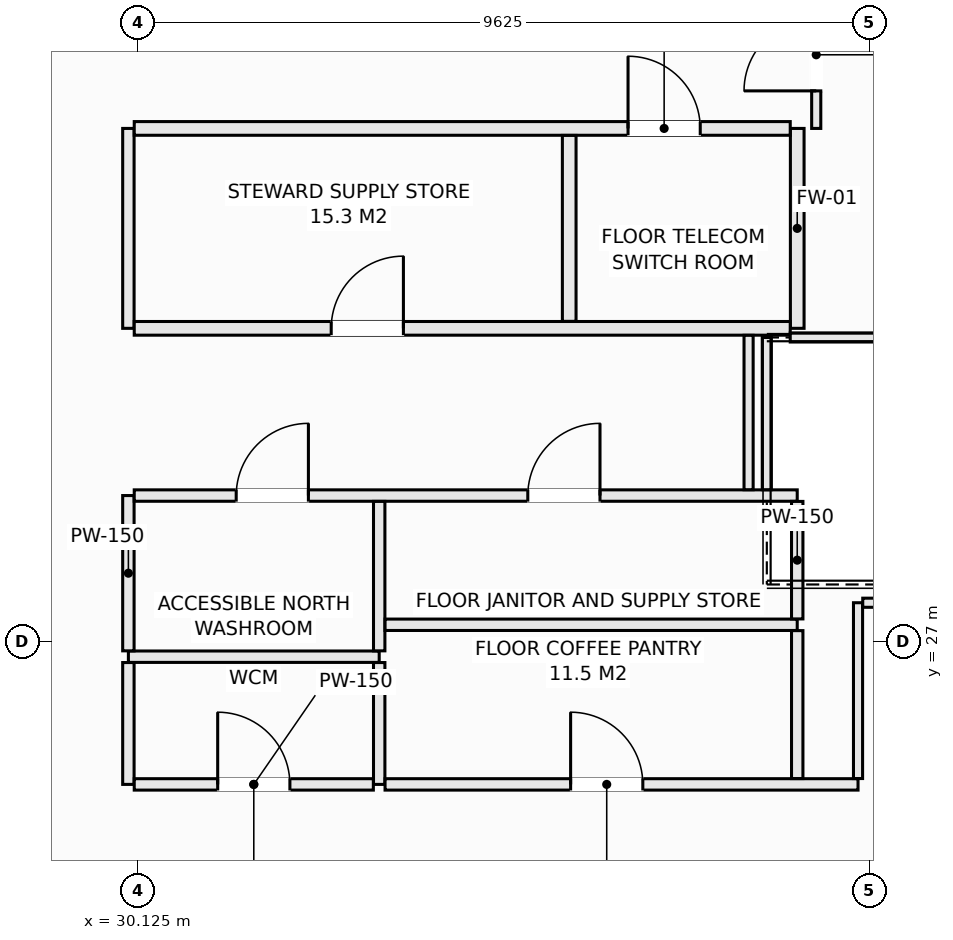
"""IFC4 building model, lengths in metres.
Left out: names, types, materials, properties, quantities, classifications, styles, units other than length and angle.
Written with IfcOpenShell. Run it as: python <this file> out.ifc"""

import sys

from ifc_helpers import new_model, si_unit, direction, frame, frame_2d, origin, place, context, subcontext, project, spatial, rectangle, extrude, element, fill, save


model = new_model("IFC4")
c1 = context("Model", 3, precision=1e-05, world=origin(), true_north=direction((0.0, 1.0)))
c2 = subcontext(c1, "Body", "Model", "MODEL_VIEW")
j1 = project(units=[si_unit("LENGTHUNIT", "METRE"), si_unit("PLANEANGLEUNIT", "RADIAN")], contexts=[c1])
p1 = place(None, origin())
s1 = spatial("IfcSite", under=j1, at=p1, CompositionType="ELEMENT")
p2 = place(p1, origin())
s2 = spatial("IfcBuilding", under=s1, at=p2, CompositionType="ELEMENT")
p3 = place(p2, frame((0.0, 0.0, 203.0)))
s3 = spatial("IfcBuildingStorey", under=s2, at=p3, CompositionType="ELEMENT", Elevation=203.0)
p4 = place(p3, frame((30.0, 26.8, 0.0), z_axis=(0.0, 0.0, 1.0), x_axis=(1.0, 0.0, 0.0)))
e1 = element("IfcWall", 1, at=p4, inside=s3, PredefinedType="PARTITIONING", context=c2, shape_type="SweptSolid", body=[
    extrude(rectangle(XDim=3.3, YDim=0.15, at=frame_2d((1.65, 0.0))), origin(), (0.0, 0.0, 1.0), 3.03),
])
p5 = place(p3, frame((30.0, 25.12, 0.0), z_axis=(0.0, 0.0, 1.0), x_axis=(0.0, 1.0, 0.0)))
e2 = element("IfcWall", 2, at=p5, inside=s3, PredefinedType="PARTITIONING", context=c2, shape_type="SweptSolid", body=[
    extrude(rectangle(XDim=1.603, YDim=0.15, at=frame_2d((0.801, 0.0))), origin(), (0.0, 0.0, 1.0), 3.03),
])
p6 = place(p3, frame((30.0, 26.877, 0.0), z_axis=(0.0, 0.0, 1.0), x_axis=(0.0, 1.0, 0.0)))
e3 = element("IfcWall", 3, at=p6, inside=s3, PredefinedType="PARTITIONING", context=c2, shape_type="SweptSolid", body=[
    extrude(rectangle(XDim=2.043, YDim=0.15, at=frame_2d((1.021, 0.0))), origin(), (0.0, 0.0, 1.0), 3.03),
])
p7 = place(p3, frame((30.0, 31.12, 0.0), z_axis=(0.0, 0.0, 1.0), x_axis=(0.0, 1.0, 0.0)))
e4 = element("IfcWall", 4, at=p7, inside=s3, PredefinedType="PARTITIONING", context=c2, shape_type="SweptSolid", body=[
    extrude(rectangle(XDim=2.63, YDim=0.15, at=frame_2d((1.315, 0.0))), origin(), (0.0, 0.0, 1.0), 3.03),
])
p8 = place(p3, frame((30.077, 28.92, 0.0), z_axis=(0.0, 0.0, 1.0), x_axis=(1.0, 0.0, 0.0)))
e5 = element("IfcWall", 5, at=p8, inside=s3, PredefinedType="PARTITIONING", context=c2, shape_type="SweptSolid", body=[
    extrude(rectangle(XDim=8.723, YDim=0.15, at=frame_2d((4.362, 0.0))), origin(), (0.0, 0.0, 1.0), 3.03),
])
p9 = place(p8, frame((1.342, 0.0, 0.0)))
e6 = element("IfcOpeningElement", 6, at=p9, cuts=e5, PredefinedType="OPENING", context=c2, shape_type="SweptSolid", body=[
    extrude(rectangle(XDim=0.95, YDim=2.1, at=frame_2d((0.475, 1.05))), frame((0.0, 0.085, 0.0), z_axis=(0.0, -1.0, 0.0), x_axis=(1.0, 0.0, 0.0)), (0.0, 0.0, 1.0), 0.17),
])
p10 = place(p8, frame((5.178, 0.0, 0.0)))
e7 = element("IfcOpeningElement", 7, at=p10, cuts=e5, PredefinedType="OPENING", context=c2, shape_type="SweptSolid", body=[
    extrude(rectangle(XDim=0.95, YDim=2.1, at=frame_2d((0.475, 1.05))), frame((0.0, 0.085, 0.0), z_axis=(0.0, -1.0, 0.0), x_axis=(1.0, 0.0, 0.0)), (0.0, 0.0, 1.0), 0.17),
])
p11 = place(p3, frame((33.3, 25.12, 0.0), z_axis=(0.0, 0.0, 1.0), x_axis=(0.0, 1.0, 0.0)))
e8 = element("IfcWall", 8, at=p11, inside=s3, PredefinedType="PARTITIONING", context=c2, shape_type="SweptSolid", body=[
    extrude(rectangle(XDim=1.603, YDim=0.15, at=frame_2d((0.801, 0.0))), origin(), (0.0, 0.0, 1.0), 3.03),
])
p12 = place(p3, frame((33.3, 26.877, 0.0), z_axis=(0.0, 0.0, 1.0), x_axis=(0.0, 1.0, 0.0)))
e9 = element("IfcWall", 9, at=p12, inside=s3, PredefinedType="PARTITIONING", context=c2, shape_type="SweptSolid", body=[
    extrude(rectangle(XDim=1.966, YDim=0.15, at=frame_2d((0.983, 0.0))), origin(), (0.0, 0.0, 1.0), 3.03),
])
p13 = place(p3, frame((30.077, 25.12, 0.0), z_axis=(0.0, 0.0, 1.0), x_axis=(1.0, 0.0, 0.0)))
e10 = element("IfcWall", 10, at=p13, inside=s3, PredefinedType="PARTITIONING", context=c2, shape_type="SweptSolid", body=[
    extrude(rectangle(XDim=3.146, YDim=0.15, at=frame_2d((1.573, 0.0))), origin(), (0.0, 0.0, 1.0), 3.03),
])
p14 = place(p13, frame((1.098, 0.0, 0.0)))
e11 = element("IfcOpeningElement", 11, at=p14, cuts=e10, PredefinedType="OPENING", context=c2, shape_type="SweptSolid", body=[
    extrude(rectangle(XDim=0.95, YDim=2.1, at=frame_2d((0.475, 1.05))), frame((0.0, 0.085, 0.0), z_axis=(0.0, -1.0, 0.0), x_axis=(1.0, 0.0, 0.0)), (0.0, 0.0, 1.0), 0.17),
])
p15 = place(p3, frame((33.377, 25.12, 0.0), z_axis=(0.0, 0.0, 1.0), x_axis=(1.0, 0.0, 0.0)))
e12 = element("IfcWall", 12, at=p15, inside=s3, PredefinedType="PARTITIONING", context=c2, shape_type="SweptSolid", body=[
    extrude(rectangle(XDim=6.223, YDim=0.15, at=frame_2d((3.112, 0.0))), origin(), (0.0, 0.0, 1.0), 3.03),
])
p16 = place(p15, frame((2.441, 0.0, 0.0)))
e13 = element("IfcOpeningElement", 13, at=p16, cuts=e12, PredefinedType="OPENING", context=c2, shape_type="SweptSolid", body=[
    extrude(rectangle(XDim=0.95, YDim=2.1, at=frame_2d((0.475, 1.05))), frame((0.0, 0.085, 0.0), z_axis=(0.0, -1.0, 0.0), x_axis=(1.0, 0.0, 0.0)), (0.0, 0.0, 1.0), 0.17),
])
p17 = place(p3, frame((33.377, 27.22, 0.0), z_axis=(0.0, 0.0, 1.0), x_axis=(1.0, 0.0, 0.0)))
e14 = element("IfcWall", 14, at=p17, inside=s3, PredefinedType="PARTITIONING", context=c2, shape_type="SweptSolid", body=[
    extrude(rectangle(XDim=5.423, YDim=0.15, at=frame_2d((2.711, 0.0))), origin(), (0.0, 0.0, 1.0), 3.03),
])
p18 = place(p3, frame((38.8, 25.197, 0.0), z_axis=(0.0, 0.0, 1.0), x_axis=(0.0, 1.0, 0.0)))
e15 = element("IfcWall", 15, at=p18, inside=s3, PredefinedType="PARTITIONING", context=c2, shape_type="SweptSolid", body=[
    extrude(rectangle(XDim=1.946, YDim=0.15, at=frame_2d((0.973, 0.0))), origin(), (0.0, 0.0, 1.0), 3.03),
])
p19 = place(p3, frame((38.8, 27.297, 0.0), z_axis=(0.0, 0.0, 1.0), x_axis=(0.0, 1.0, 0.0)))
e16 = element("IfcWall", 16, at=p19, inside=s3, PredefinedType="PARTITIONING", context=c2, shape_type="SweptSolid", body=[
    extrude(rectangle(XDim=1.546, YDim=0.15, at=frame_2d((0.773, 0.0))), origin(), (0.0, 0.0, 1.0), 3.03),
])
p20 = place(p3, frame((38.8, 31.12, 0.0), z_axis=(0.0, 0.0, 1.0), x_axis=(0.0, 1.0, 0.0)))
e17 = element("IfcWall", 17, at=p20, inside=s3, PredefinedType="SOLIDWALL", context=c2, shape_type="SweptSolid", body=[
    extrude(rectangle(XDim=2.63, YDim=0.18, at=frame_2d((1.315, 0.0))), origin(), (0.0, 0.0, 1.0), 3.03),
])
p21 = place(p3, frame((30.077, 31.12, 0.0), z_axis=(0.0, 0.0, 1.0), x_axis=(1.0, 0.0, 0.0)))
e18 = element("IfcWall", 18, at=p21, inside=s3, PredefinedType="SOLIDWALL", context=c2, shape_type="SweptSolid", body=[
    extrude(rectangle(XDim=8.631, YDim=0.18, at=frame_2d((4.315, 0.0))), origin(), (0.0, 0.0, 1.0), 3.03),
])
p22 = place(p21, frame((2.592, 0.0, 0.0)))
e19 = element("IfcOpeningElement", 19, at=p22, cuts=e18, PredefinedType="OPENING", context=c2, shape_type="SweptSolid", body=[
    extrude(rectangle(XDim=0.95, YDim=2.1, at=frame_2d((0.475, 1.05))), frame((0.0, 0.1, 0.0), z_axis=(0.0, -1.0, 0.0), x_axis=(1.0, 0.0, 0.0)), (0.0, 0.0, 1.0), 0.2),
])
p23 = place(p3, frame((30.077, 33.75, 0.0), z_axis=(0.0, 0.0, 1.0), x_axis=(1.0, 0.0, 0.0)))
e20 = element("IfcWall", 20, at=p23, inside=s3, PredefinedType="SOLIDWALL", context=c2, shape_type="SweptSolid", body=[
    extrude(rectangle(XDim=8.631, YDim=0.18, at=frame_2d((4.315, 0.0))), origin(), (0.0, 0.0, 1.0), 3.03),
])
p24 = place(p23, frame((6.497, 0.0, 0.0)))
e21 = element("IfcOpeningElement", 21, at=p24, cuts=e20, PredefinedType="OPENING", context=c2, shape_type="SweptSolid", body=[
    extrude(rectangle(XDim=0.95, YDim=2.1, at=frame_2d((0.475, 1.05))), frame((0.0, 0.1, 0.0), z_axis=(0.0, -1.0, 0.0), x_axis=(1.0, 0.0, 0.0)), (0.0, 0.0, 1.0), 0.2),
])
p25 = place(p3, frame((35.8, 31.212, 0.0), z_axis=(0.0, 0.0, 1.0), x_axis=(0.0, 1.0, 0.0)))
e22 = element("IfcWall", 22, at=p25, inside=s3, PredefinedType="SOLIDWALL", context=c2, shape_type="SweptSolid", body=[
    extrude(rectangle(XDim=2.446, YDim=0.18, at=frame_2d((1.223, 0.0))), origin(), (0.0, 0.0, 1.0), 3.03),
])
p26 = place(p3, frame((39.05, 33.75, 0.0), z_axis=(0.0, 0.0, 1.0), x_axis=(0.0, 1.0, 0.0)))
e23 = element("IfcWall", 23, at=p26, inside=s3, PredefinedType="PARTITIONING", context=c2, shape_type="SweptSolid", body=[
    extrude(rectangle(XDim=1.938, YDim=0.12, at=frame_2d((0.969, 0.0))), origin(), (0.0, 0.0, 1.0), 3.03),
])
p27 = place(p26, frame((0.494, 0.0, 0.0)))
e24 = element("IfcOpeningElement", 24, at=p27, cuts=e23, PredefinedType="OPENING", context=c2, shape_type="SweptSolid", body=[
    extrude(rectangle(XDim=0.95, YDim=2.1, at=frame_2d((0.475, 1.05))), frame((0.0, 0.07, 0.0), z_axis=(0.0, -1.0, 0.0), x_axis=(1.0, 0.0, 0.0)), (0.0, 0.0, 1.0), 0.14),
])
p28 = place(p3, frame((38.16, 28.997, 0.0), z_axis=(0.0, 0.0, 1.0), x_axis=(0.0, 1.0, 0.0)))
e25 = element("IfcWall", 25, at=p28, inside=s3, PredefinedType="PARTITIONING", context=c2, shape_type="SweptSolid", body=[
    extrude(rectangle(XDim=2.031, YDim=0.12, at=frame_2d((1.016, 0.0))), origin(), (0.0, 0.0, 1.0), 3.03),
])
p29 = place(p3, frame((39.6, 25.197, 0.0), z_axis=(0.0, 0.0, 1.0), x_axis=(0.0, 1.0, 0.0)))
e26 = element("IfcWall", 26, at=p29, inside=s3, PredefinedType="PARTITIONING", context=c2, shape_type="SweptSolid", body=[
    extrude(rectangle(XDim=2.313, YDim=0.12, at=frame_2d((1.156, 0.0))), origin(), (0.0, 0.0, 1.0), 3.03),
])
p30 = place(p3, frame((39.662, 27.51, 0.0), z_axis=(0.0, 0.0, 1.0), x_axis=(1.0, 0.0, 0.0)))
e27 = element("IfcWall", 27, at=p30, inside=s3, PredefinedType="PARTITIONING", context=c2, shape_type="SweptSolid", body=[
    extrude(rectangle(XDim=1.858, YDim=0.12, at=frame_2d((0.929, 0.0))), origin(), (0.0, 0.0, 1.0), 3.03),
])
p31 = place(p3, frame((38.708, 31.0, 0.0), z_axis=(0.0, 0.0, 1.0), x_axis=(1.0, 0.0, 0.0)))
e28 = element("IfcWall", 28, at=p31, inside=s3, PredefinedType="PARTITIONING", context=c2, shape_type="SweptSolid", body=[
    extrude(rectangle(XDim=5.302, YDim=0.12, at=frame_2d((2.651, 0.0))), origin(), (0.0, 0.0, 1.0), 3.03),
])
p32 = place(p3, frame((38.4, 28.997, 0.0), z_axis=(0.0, 0.0, 1.0), x_axis=(0.0, 1.0, 0.0)))
e29 = element("IfcWall", 29, at=p32, inside=s3, PredefinedType="PARTITIONING", context=c2, shape_type="SweptSolid", body=[
    extrude(rectangle(XDim=2.003, YDim=0.12, at=frame_2d((1.001, 0.0))), origin(), (0.0, 0.0, 1.0), 3.03),
])
p33 = place(p9, origin())
e30 = element("IfcDoor", 30, at=p33, inside=s3, OperationType="SINGLE_SWING_RIGHT", PredefinedType="DOOR", context=c2, shape_type="SweptSolid", body=[
    extrude(rectangle(XDim=0.95, YDim=2.1, at=frame_2d((0.475, 1.05))), frame((0.0, 0.025, 0.0), z_axis=(0.0, -1.0, 0.0), x_axis=(1.0, 0.0, 0.0)), (0.0, 0.0, 1.0), 0.05),
])
fill(e6, e30)
p34 = place(p14, origin())
e31 = element("IfcDoor", 31, at=p34, inside=s3, OperationType="SINGLE_SWING_LEFT", PredefinedType="DOOR", context=c2, shape_type="SweptSolid", body=[
    extrude(rectangle(XDim=0.95, YDim=2.1, at=frame_2d((0.475, 1.05))), frame((0.0, 0.025, 0.0), z_axis=(0.0, -1.0, 0.0), x_axis=(1.0, 0.0, 0.0)), (0.0, 0.0, 1.0), 0.05),
])
fill(e11, e31)
p35 = place(p10, origin())
e32 = element("IfcDoor", 32, at=p35, inside=s3, OperationType="SINGLE_SWING_RIGHT", PredefinedType="DOOR", context=c2, shape_type="SweptSolid", body=[
    extrude(rectangle(XDim=0.95, YDim=2.1, at=frame_2d((0.475, 1.05))), frame((0.0, 0.025, 0.0), z_axis=(0.0, -1.0, 0.0), x_axis=(1.0, 0.0, 0.0)), (0.0, 0.0, 1.0), 0.05),
])
fill(e7, e32)
p36 = place(p16, origin())
e33 = element("IfcDoor", 33, at=p36, inside=s3, OperationType="SINGLE_SWING_LEFT", PredefinedType="DOOR", context=c2, shape_type="SweptSolid", body=[
    extrude(rectangle(XDim=0.95, YDim=2.1, at=frame_2d((0.475, 1.05))), frame((0.0, 0.025, 0.0), z_axis=(0.0, -1.0, 0.0), x_axis=(1.0, 0.0, 0.0)), (0.0, 0.0, 1.0), 0.05),
])
fill(e13, e33)
p37 = place(p22, origin())
e34 = element("IfcDoor", 34, at=p37, inside=s3, OperationType="SINGLE_SWING_RIGHT", PredefinedType="DOOR", context=c2, shape_type="SweptSolid", body=[
    extrude(rectangle(XDim=0.95, YDim=2.1, at=frame_2d((0.475, 1.05))), frame((0.0, 0.025, 0.0), z_axis=(0.0, -1.0, 0.0), x_axis=(1.0, 0.0, 0.0)), (0.0, 0.0, 1.0), 0.05),
])
fill(e19, e34)
p38 = place(p24, origin())
e35 = element("IfcDoor", 35, at=p38, inside=s3, OperationType="SINGLE_SWING_LEFT", PredefinedType="DOOR", context=c2, shape_type="SweptSolid", body=[
    extrude(rectangle(XDim=0.95, YDim=2.1, at=frame_2d((0.475, 1.05))), frame((0.0, 0.025, 0.0), z_axis=(0.0, -1.0, 0.0), x_axis=(1.0, 0.0, 0.0)), (0.0, 0.0, 1.0), 0.05),
])
fill(e21, e35)
p39 = place(p27, origin())
e36 = element("IfcDoor", 36, at=p39, inside=s3, OperationType="SINGLE_SWING_LEFT", PredefinedType="DOOR", context=c2, shape_type="SweptSolid", body=[
    extrude(rectangle(XDim=0.95, YDim=2.1, at=frame_2d((0.475, 1.05))), frame((0.0, 0.025, 0.0), z_axis=(0.0, -1.0, 0.0), x_axis=(1.0, 0.0, 0.0)), (0.0, 0.0, 1.0), 0.05),
])
fill(e24, e36)
save(model, sys.argv[1])
